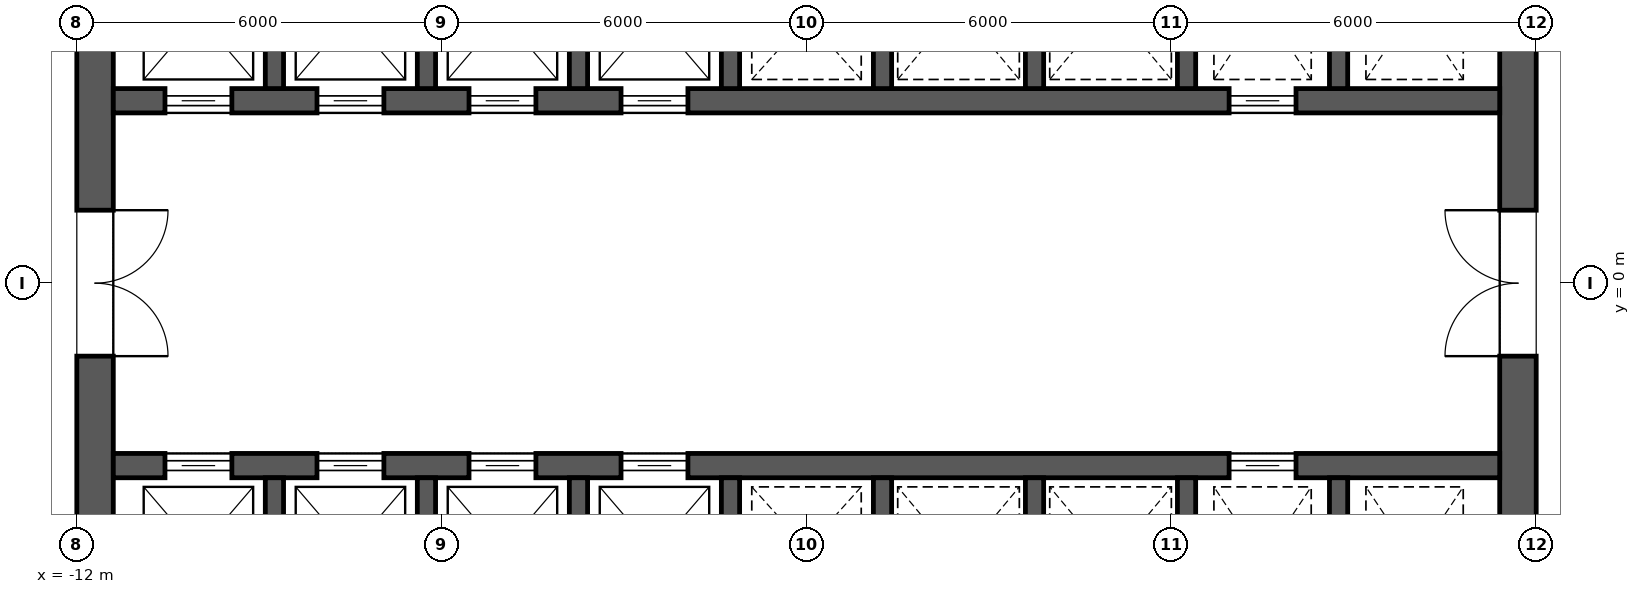
"""IFC4 building model, lengths in metres.
Left out: names, types, materials, properties, quantities, classifications, styles, units other than length and angle.
Written with IfcOpenShell. Run it as: python <this file> out.ifc"""

import sys

from ifc_helpers import new_model, si_unit, direction, frame, frame_2d, origin, place, context, subcontext, project, spatial, rectangle, extrude, element, fill, save


model = new_model("IFC4")
c1 = context("Model", 3, precision=1e-05, world=origin(), true_north=direction((0.0, 1.0)))
c2 = subcontext(c1, "Body", "Model", "MODEL_VIEW")
j1 = project(units=[si_unit("LENGTHUNIT", "METRE"), si_unit("PLANEANGLEUNIT", "RADIAN")], contexts=[c1])
p1 = place(None, origin())
s1 = spatial("IfcSite", under=j1, at=p1, CompositionType="ELEMENT")
p2 = place(p1, origin())
s2 = spatial("IfcBuilding", under=s1, at=p2, CompositionType="ELEMENT")
p3 = place(p2, frame((0.0, 0.0, 142.3)))
s3 = spatial("IfcBuildingStorey", under=s2, at=p3, CompositionType="ELEMENT", Elevation=142.3)
p4 = place(p3, frame((11.7, -11.4, 0.0), z_axis=(0.0, 0.0, 1.0), x_axis=(0.0, 1.0, 0.0)))
e1 = element("IfcWall", 1, at=p4, inside=s3, PredefinedType="SHEAR", context=c2, shape_type="SweptSolid", body=[
    extrude(rectangle(XDim=22.8, YDim=0.6, at=frame_2d((11.4, 0.0))), origin(), (0.0, 0.0, 1.0), 4.2),
])
p5 = place(p4, frame((10.2, 0.0, 0.0)))
e2 = element("IfcOpeningElement", 2, at=p5, cuts=e1, PredefinedType="OPENING", context=c2, shape_type="SweptSolid", body=[
    extrude(rectangle(XDim=2.4, YDim=2.1, at=frame_2d((1.2, 1.05))), frame((0.0, 0.312, 0.0), z_axis=(0.0, -1.0, 0.0), x_axis=(1.0, 0.0, 0.0)), (0.0, 0.0, 1.0), 0.624),
])
p6 = place(p4, frame((19.5, 0.0, 0.0)))
e3 = element("IfcOpeningElement", 3, at=p6, cuts=e1, PredefinedType="OPENING", context=c2, shape_type="SweptSolid", body=[
    extrude(rectangle(XDim=1.2, YDim=2.1, at=frame_2d((0.6, 1.05))), frame((0.0, 0.312, 0.0), z_axis=(0.0, -1.0, 0.0), x_axis=(1.0, 0.0, 0.0)), (0.0, 0.0, 1.0), 0.624),
])
p7 = place(p4, frame((2.1, 0.0, 0.0)))
e4 = element("IfcOpeningElement", 4, at=p7, cuts=e1, PredefinedType="OPENING", context=c2, shape_type="SweptSolid", body=[
    extrude(rectangle(XDim=1.2, YDim=2.1, at=frame_2d((0.6, 1.05))), frame((0.0, 0.312, 0.0), z_axis=(0.0, -1.0, 0.0), x_axis=(1.0, 0.0, 0.0)), (0.0, 0.0, 1.0), 0.624),
])
p8 = place(p3, frame((-11.7, -11.4, 0.0), z_axis=(0.0, 0.0, 1.0), x_axis=(0.0, 1.0, 0.0)))
e5 = element("IfcWall", 5, at=p8, inside=s3, PredefinedType="SHEAR", context=c2, shape_type="SweptSolid", body=[
    extrude(rectangle(XDim=22.8, YDim=0.6, at=frame_2d((11.4, 0.0))), origin(), (0.0, 0.0, 1.0), 4.2),
])
p9 = place(p8, frame((10.2, 0.0, 0.0)))
e6 = element("IfcOpeningElement", 6, at=p9, cuts=e5, PredefinedType="OPENING", context=c2, shape_type="SweptSolid", body=[
    extrude(rectangle(XDim=2.4, YDim=2.1, at=frame_2d((1.2, 1.05))), frame((0.0, 0.312, 0.0), z_axis=(0.0, -1.0, 0.0), x_axis=(1.0, 0.0, 0.0)), (0.0, 0.0, 1.0), 0.624),
])
p10 = place(p8, frame((18.925, 0.0, 0.0)))
e7 = element("IfcOpeningElement", 7, at=p10, cuts=e5, PredefinedType="OPENING", context=c2, shape_type="SweptSolid", body=[
    extrude(rectangle(XDim=1.2, YDim=2.1, at=frame_2d((0.6, 1.05))), frame((0.0, 0.312, 0.0), z_axis=(0.0, -1.0, 0.0), x_axis=(1.0, 0.0, 0.0)), (0.0, 0.0, 1.0), 0.624),
])
p11 = place(p8, frame((2.675, 0.0, 0.0)))
e8 = element("IfcOpeningElement", 8, at=p11, cuts=e5, PredefinedType="OPENING", context=c2, shape_type="SweptSolid", body=[
    extrude(rectangle(XDim=1.2, YDim=2.1, at=frame_2d((0.6, 1.05))), frame((0.0, 0.312, 0.0), z_axis=(0.0, -1.0, 0.0), x_axis=(1.0, 0.0, 0.0)), (0.0, 0.0, 1.0), 0.624),
])
p12 = place(p3, frame((-11.4, 3.0, 0.0), z_axis=(0.0, 0.0, 1.0), x_axis=(1.0, 0.0, 0.0)))
e9 = element("IfcWall", 9, at=p12, inside=s3, PredefinedType="SHEAR", context=c2, shape_type="SweptSolid", body=[
    extrude(rectangle(XDim=22.8, YDim=0.4, at=frame_2d((11.4, 0.0))), origin(), (0.0, 0.0, 1.0), 4.2),
])
p13 = place(p12, frame((0.85, 0.0, 0.0)))
e10 = element("IfcOpeningElement", 10, at=p13, cuts=e9, PredefinedType="OPENING", context=c2, shape_type="SweptSolid", body=[
    extrude(rectangle(XDim=1.1, YDim=2.1, at=frame_2d((0.55, 1.05))), frame((0.0, 0.212, 0.0), z_axis=(0.0, -1.0, 0.0), x_axis=(1.0, 0.0, 0.0)), (0.0, 0.0, 1.0), 0.424),
])
p14 = place(p12, frame((3.35, 0.0, 0.0)))
e11 = element("IfcOpeningElement", 11, at=p14, cuts=e9, PredefinedType="OPENING", context=c2, shape_type="SweptSolid", body=[
    extrude(rectangle(XDim=1.1, YDim=2.1, at=frame_2d((0.55, 1.05))), frame((0.0, 0.212, 0.0), z_axis=(0.0, -1.0, 0.0), x_axis=(1.0, 0.0, 0.0)), (0.0, 0.0, 1.0), 0.424),
])
p15 = place(p12, frame((5.85, 0.0, 0.0)))
e12 = element("IfcOpeningElement", 12, at=p15, cuts=e9, PredefinedType="OPENING", context=c2, shape_type="SweptSolid", body=[
    extrude(rectangle(XDim=1.1, YDim=2.1, at=frame_2d((0.55, 1.05))), frame((0.0, 0.212, 0.0), z_axis=(0.0, -1.0, 0.0), x_axis=(1.0, 0.0, 0.0)), (0.0, 0.0, 1.0), 0.424),
])
p16 = place(p12, frame((8.35, 0.0, 0.0)))
e13 = element("IfcOpeningElement", 13, at=p16, cuts=e9, PredefinedType="OPENING", context=c2, shape_type="SweptSolid", body=[
    extrude(rectangle(XDim=1.1, YDim=2.1, at=frame_2d((0.55, 1.05))), frame((0.0, 0.212, 0.0), z_axis=(0.0, -1.0, 0.0), x_axis=(1.0, 0.0, 0.0)), (0.0, 0.0, 1.0), 0.424),
])
p17 = place(p12, frame((18.35, 0.0, 0.0)))
e14 = element("IfcOpeningElement", 14, at=p17, cuts=e9, PredefinedType="OPENING", context=c2, shape_type="SweptSolid", body=[
    extrude(rectangle(XDim=1.1, YDim=2.1, at=frame_2d((0.55, 1.05))), frame((0.0, 0.212, 0.0), z_axis=(0.0, -1.0, 0.0), x_axis=(1.0, 0.0, 0.0)), (0.0, 0.0, 1.0), 0.424),
])
for number, where, z_axis, x_axis in (
    (15, (-8.75, 3.2, 0.0), (0.0, 0.0, 1.0), (0.0, 1.0, 0.0)),
    (16, (-6.25, 3.2, 0.0), (0.0, 0.0, 1.0), (0.0, 1.0, 0.0)),
    (17, (-3.75, 3.2, 0.0), (0.0, 0.0, 1.0), (0.0, 1.0, 0.0)),
    (18, (-1.25, 3.2, 0.0), (0.0, 0.0, 1.0), (0.0, 1.0, 0.0)),
    (19, (1.25, 3.2, 0.0), (0.0, 0.0, 1.0), (0.0, 1.0, 0.0)),
    (20, (3.75, 3.2, 0.0), (0.0, 0.0, 1.0), (0.0, 1.0, 0.0)),
    (21, (6.25, 3.2, 0.0), (0.0, 0.0, 1.0), (0.0, 1.0, 0.0)),
    (22, (8.75, 3.2, 0.0), (0.0, 0.0, 1.0), (0.0, 1.0, 0.0)),
):
    element("IfcWall", number, at=place(p3, frame(where, z_axis=z_axis, x_axis=x_axis)), inside=s3, PredefinedType="SHEAR", context=c2, shape_type="SweptSolid", body=[
        extrude(rectangle(XDim=2.9, YDim=0.3, at=frame_2d((1.45, 0.0))), origin(), (0.0, 0.0, 1.0), 4.2),
    ])
p18 = place(p3, frame((-11.4, -3.0, 0.0), z_axis=(0.0, 0.0, 1.0), x_axis=(1.0, 0.0, 0.0)))
e23 = element("IfcWall", 23, at=p18, inside=s3, PredefinedType="SHEAR", context=c2, shape_type="SweptSolid", body=[
    extrude(rectangle(XDim=22.8, YDim=0.4, at=frame_2d((11.4, 0.0))), origin(), (0.0, 0.0, 1.0), 4.2),
])
p19 = place(p18, frame((0.85, 0.0, 0.0)))
e24 = element("IfcOpeningElement", 24, at=p19, cuts=e23, PredefinedType="OPENING", context=c2, shape_type="SweptSolid", body=[
    extrude(rectangle(XDim=1.1, YDim=2.1, at=frame_2d((0.55, 1.05))), frame((0.0, 0.212, 0.0), z_axis=(0.0, -1.0, 0.0), x_axis=(1.0, 0.0, 0.0)), (0.0, 0.0, 1.0), 0.424),
])
p20 = place(p18, frame((3.35, 0.0, 0.0)))
e25 = element("IfcOpeningElement", 25, at=p20, cuts=e23, PredefinedType="OPENING", context=c2, shape_type="SweptSolid", body=[
    extrude(rectangle(XDim=1.1, YDim=2.1, at=frame_2d((0.55, 1.05))), frame((0.0, 0.212, 0.0), z_axis=(0.0, -1.0, 0.0), x_axis=(1.0, 0.0, 0.0)), (0.0, 0.0, 1.0), 0.424),
])
p21 = place(p18, frame((5.85, 0.0, 0.0)))
e26 = element("IfcOpeningElement", 26, at=p21, cuts=e23, PredefinedType="OPENING", context=c2, shape_type="SweptSolid", body=[
    extrude(rectangle(XDim=1.1, YDim=2.1, at=frame_2d((0.55, 1.05))), frame((0.0, 0.212, 0.0), z_axis=(0.0, -1.0, 0.0), x_axis=(1.0, 0.0, 0.0)), (0.0, 0.0, 1.0), 0.424),
])
p22 = place(p18, frame((8.35, 0.0, 0.0)))
e27 = element("IfcOpeningElement", 27, at=p22, cuts=e23, PredefinedType="OPENING", context=c2, shape_type="SweptSolid", body=[
    extrude(rectangle(XDim=1.1, YDim=2.1, at=frame_2d((0.55, 1.05))), frame((0.0, 0.212, 0.0), z_axis=(0.0, -1.0, 0.0), x_axis=(1.0, 0.0, 0.0)), (0.0, 0.0, 1.0), 0.424),
])
p23 = place(p18, frame((18.35, 0.0, 0.0)))
e28 = element("IfcOpeningElement", 28, at=p23, cuts=e23, PredefinedType="OPENING", context=c2, shape_type="SweptSolid", body=[
    extrude(rectangle(XDim=1.1, YDim=2.1, at=frame_2d((0.55, 1.05))), frame((0.0, 0.212, 0.0), z_axis=(0.0, -1.0, 0.0), x_axis=(1.0, 0.0, 0.0)), (0.0, 0.0, 1.0), 0.424),
])
for number, where, z_axis, x_axis in (
    (29, (-8.75, -6.1, 0.0), (0.0, 0.0, 1.0), (0.0, 1.0, 0.0)),
    (30, (-6.25, -6.1, 0.0), (0.0, 0.0, 1.0), (0.0, 1.0, 0.0)),
    (31, (-3.75, -6.1, 0.0), (0.0, 0.0, 1.0), (0.0, 1.0, 0.0)),
    (32, (-1.25, -6.1, 0.0), (0.0, 0.0, 1.0), (0.0, 1.0, 0.0)),
    (33, (1.25, -6.1, 0.0), (0.0, 0.0, 1.0), (0.0, 1.0, 0.0)),
    (34, (3.75, -6.1, 0.0), (0.0, 0.0, 1.0), (0.0, 1.0, 0.0)),
    (35, (6.25, -6.1, 0.0), (0.0, 0.0, 1.0), (0.0, 1.0, 0.0)),
    (36, (8.75, -6.1, 0.0), (0.0, 0.0, 1.0), (0.0, 1.0, 0.0)),
):
    element("IfcWall", number, at=place(p3, frame(where, z_axis=z_axis, x_axis=x_axis)), inside=s3, PredefinedType="SHEAR", context=c2, shape_type="SweptSolid", body=[
        extrude(rectangle(XDim=2.9, YDim=0.3, at=frame_2d((1.45, 0.0))), origin(), (0.0, 0.0, 1.0), 4.2),
    ])
p24 = place(p13, origin())
e37 = element("IfcDoor", 37, at=p24, inside=s3, OperationType="SLIDING_TO_LEFT", PredefinedType="DOOR", context=c2, shape_type="SweptSolid", body=[
    extrude(rectangle(XDim=1.1, YDim=2.1, at=frame_2d((0.55, 1.05))), frame((0.0, 0.025, 0.0), z_axis=(0.0, -1.0, 0.0), x_axis=(1.0, 0.0, 0.0)), (0.0, 0.0, 1.0), 0.05),
])
fill(e10, e37)
p25 = place(p14, origin())
e38 = element("IfcDoor", 38, at=p25, inside=s3, OperationType="SLIDING_TO_LEFT", PredefinedType="DOOR", context=c2, shape_type="SweptSolid", body=[
    extrude(rectangle(XDim=1.1, YDim=2.1, at=frame_2d((0.55, 1.05))), frame((0.0, 0.025, 0.0), z_axis=(0.0, -1.0, 0.0), x_axis=(1.0, 0.0, 0.0)), (0.0, 0.0, 1.0), 0.05),
])
fill(e11, e38)
p26 = place(p15, origin())
e39 = element("IfcDoor", 39, at=p26, inside=s3, OperationType="SLIDING_TO_LEFT", PredefinedType="DOOR", context=c2, shape_type="SweptSolid", body=[
    extrude(rectangle(XDim=1.1, YDim=2.1, at=frame_2d((0.55, 1.05))), frame((0.0, 0.025, 0.0), z_axis=(0.0, -1.0, 0.0), x_axis=(1.0, 0.0, 0.0)), (0.0, 0.0, 1.0), 0.05),
])
fill(e12, e39)
p27 = place(p16, origin())
e40 = element("IfcDoor", 40, at=p27, inside=s3, OperationType="SLIDING_TO_LEFT", PredefinedType="DOOR", context=c2, shape_type="SweptSolid", body=[
    extrude(rectangle(XDim=1.1, YDim=2.1, at=frame_2d((0.55, 1.05))), frame((0.0, 0.025, 0.0), z_axis=(0.0, -1.0, 0.0), x_axis=(1.0, 0.0, 0.0)), (0.0, 0.0, 1.0), 0.05),
])
fill(e13, e40)
p28 = place(p19, origin())
e41 = element("IfcDoor", 41, at=p28, inside=s3, OperationType="SLIDING_TO_LEFT", PredefinedType="DOOR", context=c2, shape_type="SweptSolid", body=[
    extrude(rectangle(XDim=1.1, YDim=2.1, at=frame_2d((0.55, 1.05))), frame((0.0, 0.025, 0.0), z_axis=(0.0, -1.0, 0.0), x_axis=(1.0, 0.0, 0.0)), (0.0, 0.0, 1.0), 0.05),
])
fill(e24, e41)
p29 = place(p20, origin())
e42 = element("IfcDoor", 42, at=p29, inside=s3, OperationType="SLIDING_TO_LEFT", PredefinedType="DOOR", context=c2, shape_type="SweptSolid", body=[
    extrude(rectangle(XDim=1.1, YDim=2.1, at=frame_2d((0.55, 1.05))), frame((0.0, 0.025, 0.0), z_axis=(0.0, -1.0, 0.0), x_axis=(1.0, 0.0, 0.0)), (0.0, 0.0, 1.0), 0.05),
])
fill(e25, e42)
p30 = place(p21, origin())
e43 = element("IfcDoor", 43, at=p30, inside=s3, OperationType="SLIDING_TO_LEFT", PredefinedType="DOOR", context=c2, shape_type="SweptSolid", body=[
    extrude(rectangle(XDim=1.1, YDim=2.1, at=frame_2d((0.55, 1.05))), frame((0.0, 0.025, 0.0), z_axis=(0.0, -1.0, 0.0), x_axis=(1.0, 0.0, 0.0)), (0.0, 0.0, 1.0), 0.05),
])
fill(e26, e43)
p31 = place(p22, origin())
e44 = element("IfcDoor", 44, at=p31, inside=s3, OperationType="SLIDING_TO_LEFT", PredefinedType="DOOR", context=c2, shape_type="SweptSolid", body=[
    extrude(rectangle(XDim=1.1, YDim=2.1, at=frame_2d((0.55, 1.05))), frame((0.0, 0.025, 0.0), z_axis=(0.0, -1.0, 0.0), x_axis=(1.0, 0.0, 0.0)), (0.0, 0.0, 1.0), 0.05),
])
fill(e27, e44)
p32 = place(p17, origin())
e45 = element("IfcDoor", 45, at=p32, inside=s3, OperationType="SLIDING_TO_LEFT", PredefinedType="DOOR", context=c2, shape_type="SweptSolid", body=[
    extrude(rectangle(XDim=1.1, YDim=2.1, at=frame_2d((0.55, 1.05))), frame((0.0, 0.025, 0.0), z_axis=(0.0, -1.0, 0.0), x_axis=(1.0, 0.0, 0.0)), (0.0, 0.0, 1.0), 0.05),
])
fill(e14, e45)
p33 = place(p23, origin())
e46 = element("IfcDoor", 46, at=p33, inside=s3, OperationType="SLIDING_TO_LEFT", PredefinedType="DOOR", context=c2, shape_type="SweptSolid", body=[
    extrude(rectangle(XDim=1.1, YDim=2.1, at=frame_2d((0.55, 1.05))), frame((0.0, 0.025, 0.0), z_axis=(0.0, -1.0, 0.0), x_axis=(1.0, 0.0, 0.0)), (0.0, 0.0, 1.0), 0.05),
])
fill(e28, e46)
p34 = place(p9, frame((2.4, 0.0, 0.0), z_axis=(0.0, 0.0, 1.0), x_axis=(-1.0, 0.0, 0.0)))
e47 = element("IfcDoor", 47, at=p34, inside=s3, OperationType="DOUBLE_DOOR_SINGLE_SWING", PredefinedType="DOOR", context=c2, shape_type="SweptSolid", body=[
    extrude(rectangle(XDim=2.4, YDim=2.1, at=frame_2d((1.2, 1.05))), frame((0.0, 0.025, 0.0), z_axis=(0.0, -1.0, 0.0), x_axis=(1.0, 0.0, 0.0)), (0.0, 0.0, 1.0), 0.05),
])
fill(e6, e47)
p35 = place(p5, origin())
e48 = element("IfcDoor", 48, at=p35, inside=s3, OperationType="DOUBLE_DOOR_SINGLE_SWING", PredefinedType="DOOR", context=c2, shape_type="SweptSolid", body=[
    extrude(rectangle(XDim=2.4, YDim=2.1, at=frame_2d((1.2, 1.05))), frame((0.0, 0.025, 0.0), z_axis=(0.0, -1.0, 0.0), x_axis=(1.0, 0.0, 0.0)), (0.0, 0.0, 1.0), 0.05),
])
fill(e2, e48)
save(model, sys.argv[1])
